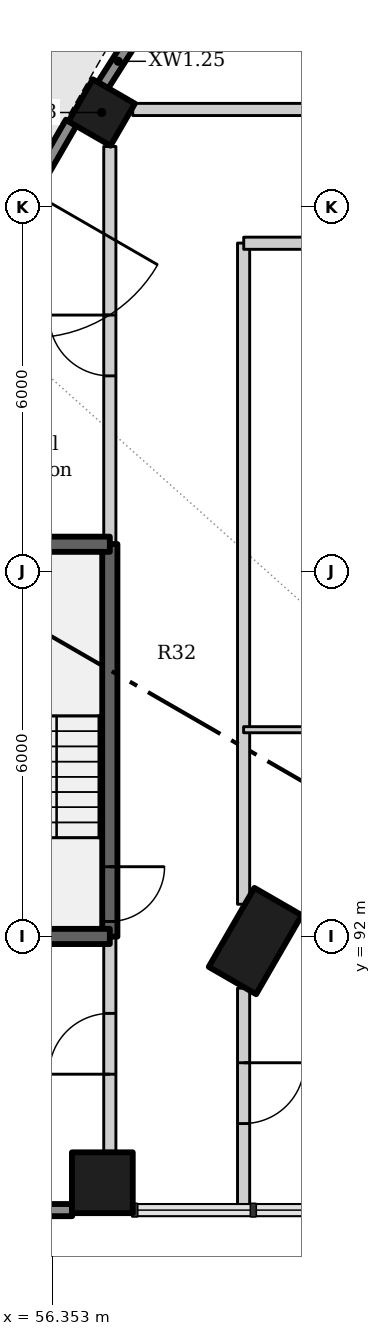
"""IFC4 building model, lengths in metres.
Left out: names, types, materials, properties, quantities, classifications, styles, units other than length and angle.
Written with IfcOpenShell. Run it as: python <this file> out.ifc"""

import sys

from ifc_helpers import new_model, si_unit, direction, frame, frame_2d, origin, origin_2d, place, context, subcontext, project, spatial, rectangle, extrude, element, fill, save


model = new_model("IFC4")
c1 = context("Model", 3, precision=1e-05, world=origin(), true_north=direction((0.0, 1.0)))
c2 = subcontext(c1, "Body", "Model", "MODEL_VIEW")
j1 = project(units=[si_unit("LENGTHUNIT", "METRE"), si_unit("PLANEANGLEUNIT", "RADIAN")], contexts=[c1])
p1 = place(None, origin())
s1 = spatial("IfcSite", under=j1, at=p1, CompositionType="ELEMENT")
p2 = place(p1, origin())
s2 = spatial("IfcBuilding", under=s1, at=p2, CompositionType="ELEMENT")
p3 = place(p2, origin())
s3 = spatial("IfcBuildingStorey", under=s2, at=p3, CompositionType="ELEMENT", Elevation=0.0)
p4 = place(p3, frame((59.692, 91.925, -1.8), z_axis=(0.0, 0.0, 1.0), x_axis=(-0.5, -0.866025403784, 0.0)))
e1 = element("IfcColumn", 1, at=p4, inside=s3, PredefinedType="COLUMN", context=c2, shape_type="SweptSolid", body=[
    extrude(rectangle(XDim=1.5, YDim=0.9, at=origin_2d()), origin(), (0.0, 0.0, 1.0), 8.4),
])
p5 = place(p3, frame((57.166, 105.55, -1.8), z_axis=(0.0, 0.0, 1.0), x_axis=(-0.5, -0.866025403784, 0.0)))
e2 = element("IfcColumn", 2, at=p5, inside=s3, PredefinedType="COLUMN", context=c2, shape_type="SweptSolid", body=[
    extrude(rectangle(XDim=0.8, YDim=0.8, at=origin_2d()), origin(), (0.0, 0.0, 1.0), 8.4),
])
p6 = place(p3, frame((57.177, 87.95, -1.8), z_axis=(0.0, 0.0, 1.0), x_axis=(1.0, 0.0, 0.0)))
e3 = element("IfcColumn", 3, at=p6, inside=s3, PredefinedType="COLUMN", context=c2, shape_type="SweptSolid", body=[
    extrude(rectangle(XDim=1.0, YDim=1.0, at=origin_2d()), origin(), (0.0, 0.0, 1.0), 8.4),
])
p7 = place(p3, frame((56.665, 105.382, 0.0), z_axis=(0.0, 0.0, 1.0), x_axis=(-0.500011252833, -0.866018906861, 0.0)))
e4 = element("IfcWall", 4, at=p7, inside=s3, PredefinedType="SOLIDWALL", context=c2, shape_type="SweptSolid", body=[
    extrude(rectangle(XDim=5.025, YDim=0.2, at=frame_2d((2.512, 0.0))), origin(), (0.0, 0.0, 1.0), 5.4),
])
p8 = place(p7, frame((1.312, 0.0, 0.0)))
e5 = element("IfcOpeningElement", 5, at=p8, cuts=e4, PredefinedType="OPENING", context=c2, shape_type="SweptSolid", body=[
    extrude(rectangle(XDim=2.4, YDim=2.7, at=frame_2d((1.2, 1.35))), frame((0.0, 0.11, 0.0), z_axis=(0.0, -1.0, 0.0), x_axis=(1.0, 0.0, 0.0)), (0.0, 0.0, 1.0), 0.22),
])
p9 = place(p3, frame((52.587, 87.5, 0.0), z_axis=(0.0, 0.0, 1.0), x_axis=(1.0, 0.0, 0.0)))
e6 = element("IfcWall", 6, at=p9, inside=s3, PredefinedType="SOLIDWALL", context=c2, shape_type="SweptSolid", body=[
    extrude(rectangle(XDim=4.094, YDim=0.2, at=frame_2d((2.047, 0.0))), origin(), (0.0, 0.0, 1.0), 5.4),
])
p10 = place(p9, frame((0.847, 0.0, 0.0)))
e7 = element("IfcOpeningElement", 7, at=p10, cuts=e6, PredefinedType="OPENING", context=c2, shape_type="SweptSolid", body=[
    extrude(rectangle(XDim=2.4, YDim=2.7, at=frame_2d((1.2, 1.35))), frame((0.0, 0.11, 0.0), z_axis=(0.0, -1.0, 0.0), x_axis=(1.0, 0.0, 0.0)), (0.0, 0.0, 1.0), 0.22),
])
p11 = place(p3, frame((59.911, 110.274, 0.0), z_axis=(0.0, 0.0, 1.0), x_axis=(-0.537224370512, -0.843439372882, 0.0)))
e8 = element("IfcWall", 8, at=p11, inside=s3, PredefinedType="SOLIDWALL", context=c2, shape_type="SweptSolid", body=[
    extrude(rectangle(XDim=5.071, YDim=0.2, at=frame_2d((2.535, 0.0))), origin(), (0.0, 0.0, 1.0), 5.4),
])
p12 = place(p11, frame((1.035, 0.0, 0.0)))
e9 = element("IfcOpeningElement", 9, at=p12, cuts=e8, PredefinedType="OPENING", context=c2, shape_type="SweptSolid", body=[
    extrude(rectangle(XDim=3.0, YDim=3.0, at=frame_2d((1.5, 1.5))), frame((0.0, 0.11, 0.0), z_axis=(0.0, -1.0, 0.0), x_axis=(1.0, 0.0, 0.0)), (0.0, 0.0, 1.0), 0.22),
])
p13 = place(p3, frame((57.677, 105.6, 0.0), z_axis=(0.0, 0.0, 1.0), x_axis=(1.0, 0.0, 0.0)))
e10 = element("IfcWall", 10, at=p13, inside=s3, PredefinedType="PARTITIONING", context=c2, shape_type="SweptSolid", body=[
    extrude(rectangle(XDim=20.723, YDim=0.2, at=frame_2d((10.362, 0.0))), origin(), (0.0, 0.0, 1.0), 6.3),
])
p14 = place(p13, frame((8.373, 0.0, 0.0)))
e11 = element("IfcOpeningElement", 11, at=p14, cuts=e10, PredefinedType="OPENING", context=c2, shape_type="SweptSolid", body=[
    extrude(rectangle(XDim=1.0, YDim=2.1, at=frame_2d((0.5, 1.05))), frame((0.0, 0.11, 0.0), z_axis=(0.0, -1.0, 0.0), x_axis=(1.0, 0.0, 0.0)), (0.0, 0.0, 1.0), 0.22),
])
p15 = place(p3, frame((57.3, 98.453, -1.8), z_axis=(0.0, 0.0, 1.0), x_axis=(0.0, -1.0, 0.0)))
e12 = element("IfcWall", 12, at=p15, inside=s3, PredefinedType="SHEAR", context=c2, shape_type="SweptSolid", body=[
    extrude(rectangle(XDim=6.456, YDim=0.25, at=frame_2d((3.228, 0.0))), origin(), (0.0, 0.0, 1.0), 8.1),
])
p16 = place(p15, frame((5.306, 0.0, 1.8)))
e13 = element("IfcOpeningElement", 13, at=p16, cuts=e12, PredefinedType="OPENING", context=c2, shape_type="SweptSolid", body=[
    extrude(rectangle(XDim=0.9, YDim=2.1, at=frame_2d((0.45, 1.05))), frame((0.0, 0.135, 0.0), z_axis=(0.0, -1.0, 0.0), x_axis=(1.0, 0.0, 0.0)), (0.0, 0.0, 1.0), 0.27),
])
p17 = place(p3, frame((57.3, 88.467, 0.0), z_axis=(0.0, 0.0, 1.0), x_axis=(0.0, 1.0, 0.0)))
e14 = element("IfcWall", 14, at=p17, inside=s3, PredefinedType="PARTITIONING", context=c2, shape_type="SweptSolid", body=[
    extrude(rectangle(XDim=3.536, YDim=0.2, at=frame_2d((1.768, 0.0))), origin(), (0.0, 0.0, 1.0), 6.3),
])
p18 = place(p17, frame((1.268, 0.0, 0.0)))
e15 = element("IfcOpeningElement", 15, at=p18, cuts=e14, PredefinedType="OPENING", context=c2, shape_type="SweptSolid", body=[
    extrude(rectangle(XDim=1.0, YDim=2.1, at=frame_2d((0.5, 1.05))), frame((0.0, 0.11, 0.0), z_axis=(0.0, -1.0, 0.0), x_axis=(1.0, 0.0, 0.0)), (0.0, 0.0, 1.0), 0.22),
])
p19 = place(p3, frame((57.3, 98.447, 0.0), z_axis=(0.0, 0.0, 1.0), x_axis=(0.0, 1.0, 0.0)))
e16 = element("IfcWall", 16, at=p19, inside=s3, PredefinedType="PARTITIONING", context=c2, shape_type="SweptSolid", body=[
    extrude(rectangle(XDim=6.544, YDim=0.2, at=frame_2d((3.272, 0.0))), origin(), (0.0, 0.0, 1.0), 6.3),
])
p20 = place(p19, frame((2.772, 0.0, 0.0)))
e17 = element("IfcOpeningElement", 17, at=p20, cuts=e16, PredefinedType="OPENING", context=c2, shape_type="SweptSolid", body=[
    extrude(rectangle(XDim=1.0, YDim=2.1, at=frame_2d((0.5, 1.05))), frame((0.0, 0.11, 0.0), z_axis=(0.0, -1.0, 0.0), x_axis=(1.0, 0.0, 0.0)), (0.0, 0.0, 1.0), 0.22),
])
p21 = place(p3, frame((59.5, 91.149, 0.0), z_axis=(0.0, 0.0, 1.0), x_axis=(0.0, -1.0, 0.0)))
e18 = element("IfcWall", 18, at=p21, inside=s3, PredefinedType="PARTITIONING", context=c2, shape_type="SweptSolid", body=[
    extrude(rectangle(XDim=3.569, YDim=0.2, at=frame_2d((1.785, 0.0))), origin(), (0.0, 0.0, 1.0), 5.53),
])
p22 = place(p21, frame((1.226, 0.0, 0.0)))
e19 = element("IfcOpeningElement", 19, at=p22, cuts=e18, PredefinedType="OPENING", context=c2, shape_type="SweptSolid", body=[
    extrude(rectangle(XDim=1.0, YDim=2.1, at=frame_2d((0.5, 1.05))), frame((0.0, 0.11, 0.0), z_axis=(0.0, -1.0, 0.0), x_axis=(1.0, 0.0, 0.0)), (0.0, 0.0, 1.0), 0.22),
])
p23 = place(p3, frame((59.5, 92.53, 0.0), z_axis=(0.0, 0.0, 1.0), x_axis=(0.0, 1.0, 0.0)))
e20 = element("IfcWall", 20, at=p23, inside=s3, PredefinedType="PARTITIONING", context=c2, shape_type="SweptSolid", body=[
    extrude(rectangle(XDim=10.873, YDim=0.2, at=frame_2d((5.437, 0.0))), origin(), (0.0, 0.0, 1.0), 6.3),
])
p24 = place(p3, frame((66.642, 103.4, 0.0), z_axis=(0.0, 0.0, 1.0), x_axis=(-1.0, 0.0, 0.0)))
e21 = element("IfcWall", 21, at=p24, inside=s3, PredefinedType="PARTITIONING", context=c2, shape_type="SweptSolid", body=[
    extrude(rectangle(XDim=7.14, YDim=0.2, at=frame_2d((3.57, 0.0))), origin(), (0.0, 0.0, 1.0), 6.3),
])
p25 = place(p24, frame((3.073, 0.0, 0.0)))
e22 = element("IfcOpeningElement", 22, at=p25, cuts=e21, PredefinedType="OPENING", context=c2, shape_type="SweptSolid", body=[
    extrude(rectangle(XDim=1.0, YDim=2.1, at=frame_2d((0.5, 1.05))), frame((0.0, 0.11, 0.0), z_axis=(0.0, -1.0, 0.0), x_axis=(1.0, 0.0, 0.0)), (0.0, 0.0, 1.0), 0.22),
])
for number, where, z_axis, x_axis in (
    (23, (53.85, 92.0, -1.8), (0.0, 0.0, 1.0), (1.0, 0.0, 0.0)),
    (24, (53.85, 98.45, -1.8), (0.0, 0.0, 1.0), (1.0, 0.0, 0.0)),
):
    element("IfcWall", number, at=place(p3, frame(where, z_axis=z_axis, x_axis=x_axis)), inside=s3, PredefinedType="SHEAR", context=c2, shape_type="SweptSolid", body=[
        extrude(rectangle(XDim=3.45, YDim=0.25, at=frame_2d((1.725, 0.0))), origin(), (0.0, 0.0, 1.0), 8.1),
    ])
p26 = place(p3, frame((59.5, 95.4, 0.0), z_axis=(0.0, 0.0, 1.0), x_axis=(1.0, 0.0, 0.0)))
e25 = element("IfcWall", 25, at=p26, inside=s3, PredefinedType="PARTITIONING", context=c2, shape_type="SweptSolid", body=[
    extrude(rectangle(XDim=2.82, YDim=0.1, at=frame_2d((1.41, 0.0))), origin(), (0.0, 0.0, 1.0), 5.38),
])
p27 = place(p16, origin())
e26 = element("IfcDoor", 26, at=p27, inside=s3, OperationType="SINGLE_SWING_LEFT", PredefinedType="DOOR", context=c2, shape_type="SweptSolid", body=[
    extrude(rectangle(XDim=0.9, YDim=2.1, at=frame_2d((0.45, 1.05))), frame((0.0, 0.025, 0.0), z_axis=(0.0, -1.0, 0.0), x_axis=(1.0, 0.0, 0.0)), (0.0, 0.0, 1.0), 0.05),
])
fill(e13, e26)
p28 = place(p18, origin())
e27 = element("IfcDoor", 27, at=p28, inside=s3, OperationType="SINGLE_SWING_LEFT", PredefinedType="DOOR", context=c2, shape_type="SweptSolid", body=[
    extrude(rectangle(XDim=1.0, YDim=2.1, at=frame_2d((0.5, 1.05))), frame((0.0, 0.025, 0.0), z_axis=(0.0, -1.0, 0.0), x_axis=(1.0, 0.0, 0.0)), (0.0, 0.0, 1.0), 0.05),
])
fill(e15, e27)
p29 = place(p20, origin())
e28 = element("IfcDoor", 28, at=p29, inside=s3, OperationType="SINGLE_SWING_RIGHT", PredefinedType="DOOR", context=c2, shape_type="SweptSolid", body=[
    extrude(rectangle(XDim=1.0, YDim=2.1, at=frame_2d((0.5, 1.05))), frame((0.0, 0.025, 0.0), z_axis=(0.0, -1.0, 0.0), x_axis=(1.0, 0.0, 0.0)), (0.0, 0.0, 1.0), 0.05),
])
fill(e17, e28)
p30 = place(p22, origin())
e29 = element("IfcDoor", 29, at=p30, inside=s3, OperationType="SINGLE_SWING_LEFT", PredefinedType="DOOR", context=c2, shape_type="SweptSolid", body=[
    extrude(rectangle(XDim=1.0, YDim=2.1, at=frame_2d((0.5, 1.05))), frame((0.0, 0.025, 0.0), z_axis=(0.0, -1.0, 0.0), x_axis=(1.0, 0.0, 0.0)), (0.0, 0.0, 1.0), 0.05),
])
fill(e19, e29)
save(model, sys.argv[1])
